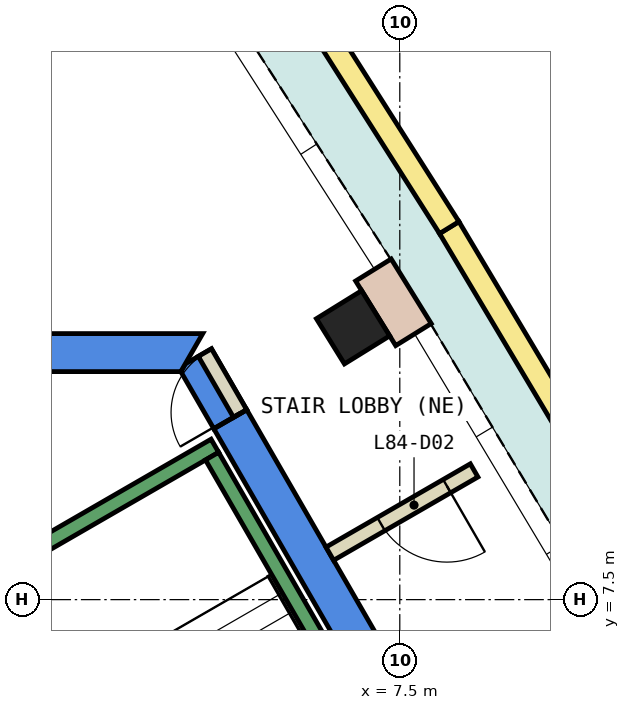
"""IFC4 building model, lengths in metres.
Left out: names, types, materials, properties, quantities, classifications, styles, units other than length and angle.
Written with IfcOpenShell. Run it as: python <this file> out.ifc"""

import sys

from ifc_helpers import new_model, si_unit, direction, frame, frame_2d, origin, origin_2d, place, context, subcontext, project, spatial, polyline, rectangle, outline, extrude, element, fill, save


model = new_model("IFC4")
c1 = context("Model", 3, precision=1e-05, world=origin(), true_north=direction((0.0, 1.0)))
c2 = subcontext(c1, "Body", "Model", "MODEL_VIEW")
j1 = project(units=[si_unit("LENGTHUNIT", "METRE"), si_unit("PLANEANGLEUNIT", "RADIAN")], contexts=[c1])
p1 = place(None, origin())
s1 = spatial("IfcSite", under=j1, at=p1, CompositionType="ELEMENT")
p2 = place(p1, origin())
s2 = spatial("IfcBuilding", under=s1, at=p2, CompositionType="ELEMENT")
p3 = place(p2, frame((0.0, 0.0, 358.4)))
s3 = spatial("IfcBuildingStorey", under=s2, at=p3, CompositionType="ELEMENT", Elevation=358.4)
p4 = place(p3, frame((6.885, 11.083, 0.0), z_axis=(0.0, 0.0, 1.0), x_axis=(-0.526688767833, 0.850058199089, 0.0)))
e1 = element("IfcColumn", 1, at=p4, inside=s3, PredefinedType="COLUMN", context=c2, shape_type="SweptSolid", body=[
    extrude(rectangle(XDim=0.7, YDim=0.7, at=origin_2d()), origin(), (0.0, 0.0, 1.0), 4.05),
])
p5 = place(p3, frame((0.0, 0.0, -0.45)))
e2 = element("IfcWall", 2, at=p5, inside=s3, PredefinedType="SHEAR", context=c2, shape_type="SweptSolid", body=[
    extrude(outline(polyline([(5.486, 9.998), (5.053, 9.748), (9.238, 2.5), (9.815, 2.5), (5.486, 9.998)])), origin(), (0.0, 0.0, 1.0), 4.5),
])
p6 = place(p3, frame((0.0, 0.0, 3.6)))
e3 = element("IfcWall", 3, at=p6, inside=s3, PredefinedType="SHEAR", context=c2, shape_type="SweptSolid", body=[
    extrude(outline(polyline([(5.022, 10.8), (4.677, 10.601), (4.619, 10.5), (5.053, 9.748), (5.486, 9.998), (5.022, 10.8)])), origin(), (0.0, 0.0, 1.0), 0.45),
])
p7 = place(p3, frame((0.0, 0.0, -0.45)))
e4 = element("IfcWall", 4, at=p7, inside=s3, PredefinedType="SHEAR", context=c2, shape_type="SweptSolid", body=[
    extrude(outline(polyline([(4.907, 11.0), (-4.907, 11.0), (-4.619, 10.5), (4.619, 10.5), (4.907, 11.0)])), origin(), (0.0, 0.0, 1.0), 4.5),
])
p8 = place(p3, frame((7.68, 10.987, 0.0), z_axis=(0.0, 0.0, 1.0), x_axis=(-0.526900867702, 0.849926747205, 0.0)))
e5 = element("IfcWall", 5, at=p8, inside=s3, PredefinedType="STANDARD", context=c2, shape_type="SweptSolid", body=[
    extrude(rectangle(XDim=1.0, YDim=0.55, at=frame_2d((0.5, 0.0))), origin(), (0.0, 0.0, 1.0), 4.05),
])
p9 = place(p3, origin())
e6 = element("IfcWall", 6, at=p9, inside=s3, PredefinedType="PARAPET", context=c2, shape_type="SweptSolid", body=[
    extrude(outline(polyline([(11.691, 6.75), (8.278, 12.473), (8.023, 12.316), (11.431, 6.6), (11.691, 6.75)])), origin(), (0.0, 0.0, 1.0), 1.1),
])
p10 = place(p3, origin())
e7 = element("IfcWall", 7, at=p10, inside=s3, PredefinedType="PARAPET", context=c2, shape_type="SweptSolid", body=[
    extrude(outline(polyline([(8.278, 12.473), (4.704, 18.096), (4.493, 17.869), (8.023, 12.316), (8.278, 12.473)])), origin(), (0.0, 0.0, 1.0), 1.1),
])
p11 = place(p3, frame((8.478, 9.2, 0.0), z_axis=(0.0, 0.0, 1.0), x_axis=(-0.866104006239, -0.499863831834, 0.0)))
e8 = element("IfcWall", 8, at=p11, inside=s3, PredefinedType="PARTITIONING", context=c2, shape_type="SweptSolid", body=[
    extrude(rectangle(XDim=2.192, YDim=0.2, at=frame_2d((1.096, 0.0))), origin(), (0.0, 0.0, 1.0), 4.05),
])
p12 = place(p11, frame((0.413, 0.0, 0.0)))
e9 = element("IfcOpeningElement", 9, at=p12, cuts=e8, PredefinedType="OPENING", context=c2, shape_type="SweptSolid", body=[
    extrude(rectangle(XDim=1.0, YDim=2.1, at=frame_2d((0.5, 1.05))), frame((0.0, 0.11, 0.0), z_axis=(0.0, -1.0, 0.0), x_axis=(1.0, 0.0, 0.0)), (0.0, 0.0, 1.0), 0.22),
])
p13 = place(p3, frame((5.399, 9.948, 0.0), z_axis=(0.0, 0.0, 1.0), x_axis=(-0.499882215713, 0.866093395895, 0.0)))
e10 = element("IfcWall", 10, at=p13, inside=s3, PredefinedType="PARTITIONING", context=c2, shape_type="SweptSolid", body=[
    extrude(rectangle(XDim=0.926, YDim=0.2, at=frame_2d((0.463, 0.0))), origin(), (0.0, 0.0, 1.0), 2.4),
])
p14 = place(p13, frame((0.017, 0.0, 0.0)))
e11 = element("IfcOpeningElement", 11, at=p14, cuts=e10, PredefinedType="OPENING", context=c2, shape_type="SweptSolid", body=[
    extrude(rectangle(XDim=0.9, YDim=2.1, at=frame_2d((0.45, 1.05))), frame((0.0, 0.11, 0.0), z_axis=(0.0, -1.0, 0.0), x_axis=(1.0, 0.0, 0.0)), (0.0, 0.0, 1.0), 0.22),
])
p15 = place(p3, frame((1.256, 7.324, 0.0), z_axis=(0.0, 0.0, 1.0), x_axis=(0.866046073146, 0.499964197906, 0.0)))
e12 = element("IfcWall", 12, at=p15, inside=s3, PredefinedType="STANDARD", context=c2, shape_type="SweptSolid", body=[
    extrude(rectangle(XDim=4.4, YDim=0.2, at=frame_2d((2.2, 0.0))), origin(), (0.0, 0.0, 1.0), 4.05),
])
p16 = place(p3, frame((4.843, 1.312, 0.0), z_axis=(0.0, 0.0, 1.0), x_axis=(-0.499963383562, 0.866046543262, 0.0)))
e13 = element("IfcWall", 13, at=p16, inside=s3, PredefinedType="STANDARD", context=c2, shape_type="SweptSolid", body=[
    extrude(rectangle(XDim=6.9, YDim=0.2, at=frame_2d((3.45, 0.0))), origin(), (0.0, 0.0, 1.0), 4.05),
])
p17 = place(p16, frame((0.45, 0.0, 0.0)))
e14 = element("IfcOpeningElement", 14, at=p17, cuts=e13, PredefinedType="OPENING", context=c2, shape_type="SweptSolid", body=[
    extrude(rectangle(XDim=1.1, YDim=2.2, at=frame_2d((0.55, 1.1))), frame((0.0, 0.11, 0.0), z_axis=(0.0, -1.0, 0.0), x_axis=(1.0, 0.0, 0.0)), (0.0, 0.0, 1.0), 0.22),
])
p18 = place(p3, frame((8.48, 3.412, 0.0), z_axis=(0.0, 0.0, 1.0), x_axis=(-0.499978703459, 0.866037698999, 0.0)))
e15 = element("IfcWall", 15, at=p18, inside=s3, PredefinedType="STANDARD", context=c2, shape_type="SweptSolid", body=[
    extrude(rectangle(XDim=6.9, YDim=0.2, at=frame_2d((3.45, 0.0))), origin(), (0.0, 0.0, 1.0), 4.05),
])
p19 = place(p12, origin())
e16 = element("IfcDoor", 16, at=p19, inside=s3, OperationType="SINGLE_SWING_LEFT", PredefinedType="DOOR", context=c2, shape_type="SweptSolid", body=[
    extrude(rectangle(XDim=1.0, YDim=2.1, at=frame_2d((0.5, 1.05))), frame((0.0, 0.025, 0.0), z_axis=(0.0, -1.0, 0.0), x_axis=(1.0, 0.0, 0.0)), (0.0, 0.0, 1.0), 0.05),
])
fill(e9, e16)
p20 = place(p14, origin())
e17 = element("IfcDoor", 17, at=p20, inside=s3, OperationType="SINGLE_SWING_LEFT", PredefinedType="DOOR", context=c2, shape_type="SweptSolid", body=[
    extrude(rectangle(XDim=0.9, YDim=2.1, at=frame_2d((0.45, 1.05))), frame((0.0, 0.025, 0.0), z_axis=(0.0, -1.0, 0.0), x_axis=(1.0, 0.0, 0.0)), (0.0, 0.0, 1.0), 0.05),
])
fill(e11, e17)
save(model, sys.argv[1])
